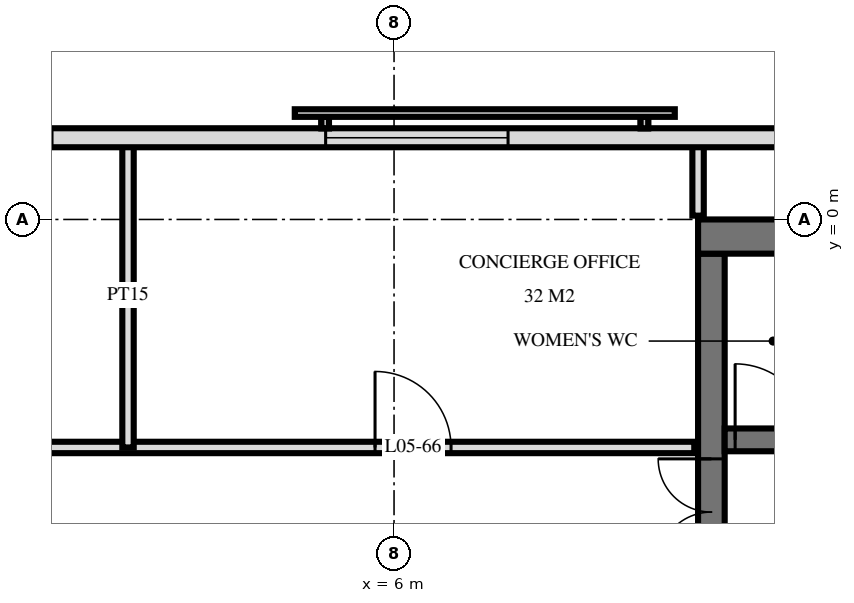
"""IFC4 building model, lengths in metres.
Left out: names, types, materials, properties, quantities, classifications, styles, units other than length and angle.
Written with IfcOpenShell. Run it as: python <this file> out.ifc"""

import sys

from ifc_helpers import new_model, si_unit, direction, frame, frame_2d, origin, place, context, subcontext, project, spatial, rectangle, extrude, element, fill, save


model = new_model("IFC4")
c1 = context("Model", 3, precision=1e-05, world=origin(), true_north=direction((0.0, 1.0)))
c2 = subcontext(c1, "Body", "Model", "MODEL_VIEW")
j1 = project(units=[si_unit("LENGTHUNIT", "METRE"), si_unit("PLANEANGLEUNIT", "RADIAN")], contexts=[c1])
p1 = place(None, origin())
s1 = spatial("IfcSite", under=j1, at=p1, CompositionType="ELEMENT")
p2 = place(p1, origin())
s2 = spatial("IfcBuilding", under=s1, at=p2, CompositionType="ELEMENT")
p3 = place(p2, frame((0.0, 0.0, 27.6)))
s3 = spatial("IfcBuildingStorey", under=s2, at=p3, CompositionType="ELEMENT", Elevation=27.6)
p4 = place(p3, frame((10.0, -0.225, 0.0), z_axis=(0.0, 0.0, 1.0), x_axis=(1.0, 0.0, 0.0)))
e1 = element("IfcWall", 1, at=p4, inside=s3, PredefinedType="SHEAR", context=c2, shape_type="SweptSolid", body=[
    extrude(rectangle(XDim=19.5, YDim=0.45, at=frame_2d((9.75, 0.0))), origin(), (0.0, 0.0, 1.0), 3.6),
])
p5 = place(p3, frame((10.175, -14.55, 0.0), z_axis=(0.0, 0.0, 1.0), x_axis=(0.0, 1.0, 0.0)))
e2 = element("IfcWall", 2, at=p5, inside=s3, PredefinedType="SHEAR", context=c2, shape_type="SweptSolid", body=[
    extrude(rectangle(XDim=14.1, YDim=0.35, at=frame_2d((7.05, 0.0))), origin(), (0.0, 0.0, 1.0), 3.6),
])
p6 = place(p5, frame((8.4, 0.0, 0.0)))
e3 = element("IfcOpeningElement", 3, at=p6, cuts=e2, PredefinedType="OPENING", context=c2, shape_type="SweptSolid", body=[
    extrude(rectangle(XDim=1.4, YDim=2.4, at=frame_2d((0.7, 1.2))), frame((0.0, 0.185, 0.0), z_axis=(0.0, -1.0, 0.0), x_axis=(1.0, 0.0, 0.0)), (0.0, 0.0, 1.0), 0.37),
])
p7 = place(p5, frame((10.0, 0.0, 0.0)))
e4 = element("IfcOpeningElement", 4, at=p7, cuts=e2, PredefinedType="OPENING", context=c2, shape_type="SweptSolid", body=[
    extrude(rectangle(XDim=1.4, YDim=2.4, at=frame_2d((0.7, 1.2))), frame((0.0, 0.185, 0.0), z_axis=(0.0, -1.0, 0.0), x_axis=(1.0, 0.0, 0.0)), (0.0, 0.0, 1.0), 0.37),
])
p8 = place(p5, frame((4.0, 0.0, 0.0)))
e5 = element("IfcOpeningElement", 5, at=p8, cuts=e2, PredefinedType="OPENING", context=c2, shape_type="SweptSolid", body=[
    extrude(rectangle(XDim=1.2, YDim=2.1, at=frame_2d((0.6, 1.05))), frame((0.0, 0.185, 0.0), z_axis=(0.0, -1.0, 0.0), x_axis=(1.0, 0.0, 0.0)), (0.0, 0.0, 1.0), 0.37),
])
p9 = place(p3, frame((10.35, -2.9, 0.0), z_axis=(0.0, 0.0, 1.0), x_axis=(1.0, 0.0, 0.0)))
e6 = element("IfcWall", 6, at=p9, inside=s3, PredefinedType="SHEAR", context=c2, shape_type="SweptSolid", body=[
    extrude(rectangle(XDim=18.7, YDim=0.3, at=frame_2d((9.35, 0.0))), origin(), (0.0, 0.0, 1.0), 3.6),
])
p10 = place(p9, frame((14.65, 0.0, 0.0)))
e7 = element("IfcOpeningElement", 7, at=p10, cuts=e6, PredefinedType="OPENING", context=c2, shape_type="SweptSolid", body=[
    extrude(rectangle(XDim=1.1, YDim=2.1, at=frame_2d((0.55, 1.05))), frame((0.0, 0.16, 0.0), z_axis=(0.0, -1.0, 0.0), x_axis=(1.0, 0.0, 0.0)), (0.0, 0.0, 1.0), 0.32),
])
p11 = place(p9, frame((17.05, 0.0, 0.0)))
e8 = element("IfcOpeningElement", 8, at=p11, cuts=e6, PredefinedType="OPENING", context=c2, shape_type="SweptSolid", body=[
    extrude(rectangle(XDim=1.1, YDim=2.1, at=frame_2d((0.55, 1.05))), frame((0.0, 0.16, 0.0), z_axis=(0.0, -1.0, 0.0), x_axis=(1.0, 0.0, 0.0)), (0.0, 0.0, 1.0), 0.32),
])
p12 = place(p9, frame((6.188, 0.0, 0.0)))
e9 = element("IfcOpeningElement", 9, at=p12, cuts=e6, PredefinedType="OPENING", context=c2, shape_type="SweptSolid", body=[
    extrude(rectangle(XDim=0.9, YDim=2.1, at=frame_2d((0.45, 1.05))), frame((0.0, 0.16, 0.0), z_axis=(0.0, -1.0, 0.0), x_axis=(1.0, 0.0, 0.0)), (0.0, 0.0, 1.0), 0.32),
])
p13 = place(p9, frame((7.613, 0.0, 0.0)))
e10 = element("IfcOpeningElement", 10, at=p13, cuts=e6, PredefinedType="OPENING", context=c2, shape_type="SweptSolid", body=[
    extrude(rectangle(XDim=0.9, YDim=2.1, at=frame_2d((0.45, 1.05))), frame((0.0, 0.16, 0.0), z_axis=(0.0, -1.0, 0.0), x_axis=(1.0, 0.0, 0.0)), (0.0, 0.0, 1.0), 0.32),
])
p14 = place(p9, frame((0.137, 0.0, 0.0)))
e11 = element("IfcOpeningElement", 11, at=p14, cuts=e6, PredefinedType="OPENING", context=c2, shape_type="SweptSolid", body=[
    extrude(rectangle(XDim=1.0, YDim=2.1, at=frame_2d((0.5, 1.05))), frame((0.0, 0.16, 0.0), z_axis=(0.0, -1.0, 0.0), x_axis=(1.0, 0.0, 0.0)), (0.0, 0.0, 1.0), 0.32),
])
p15 = place(p9, frame((1.562, 0.0, 0.0)))
e12 = element("IfcOpeningElement", 12, at=p15, cuts=e6, PredefinedType="OPENING", context=c2, shape_type="SweptSolid", body=[
    extrude(rectangle(XDim=1.0, YDim=2.1, at=frame_2d((0.5, 1.05))), frame((0.0, 0.16, 0.0), z_axis=(0.0, -1.0, 0.0), x_axis=(1.0, 0.0, 0.0)), (0.0, 0.0, 1.0), 0.32),
])
p16 = place(p9, frame((3.85, 0.0, 0.0)))
e13 = element("IfcOpeningElement", 13, at=p16, cuts=e6, PredefinedType="OPENING", context=c2, shape_type="SweptSolid", body=[
    extrude(rectangle(XDim=1.0, YDim=2.1, at=frame_2d((0.5, 1.05))), frame((0.0, 0.16, 0.0), z_axis=(0.0, -1.0, 0.0), x_axis=(1.0, 0.0, 0.0)), (0.0, 0.0, 1.0), 0.32),
])
p17 = place(p9, frame((12.1, 0.0, 0.0)))
e14 = element("IfcOpeningElement", 14, at=p17, cuts=e6, PredefinedType="OPENING", context=c2, shape_type="SweptSolid", body=[
    extrude(rectangle(XDim=1.0, YDim=2.1, at=frame_2d((0.5, 1.05))), frame((0.0, 0.16, 0.0), z_axis=(0.0, -1.0, 0.0), x_axis=(1.0, 0.0, 0.0)), (0.0, 0.0, 1.0), 0.32),
])
p18 = place(p3, frame((28.775, 1.075, 0.0), z_axis=(0.0, 0.0, 1.0), x_axis=(-1.0, 0.0, 0.0)))
e15 = element("IfcWall", 15, at=p18, inside=s3, PredefinedType="SOLIDWALL", context=c2, shape_type="SweptSolid", body=[
    extrude(rectangle(XDim=57.551, YDim=0.25, at=frame_2d((28.775, 0.0))), origin(), (0.0, 0.0, 1.0), 3.32),
])
p19 = place(p18, frame((21.275, 0.0, 0.3)))
e16 = element("IfcOpeningElement", 16, at=p19, cuts=e15, PredefinedType="OPENING", context=c2, shape_type="SweptSolid", body=[
    extrude(rectangle(XDim=2.4, YDim=2.1, at=frame_2d((1.2, 1.05))), frame((0.0, 0.135, 0.0), z_axis=(0.0, -1.0, 0.0), x_axis=(1.0, 0.0, 0.0)), (0.0, 0.0, 1.0), 0.27),
])
p20 = place(p18, frame((27.275, 0.0, 0.3)))
e17 = element("IfcOpeningElement", 17, at=p20, cuts=e15, PredefinedType="OPENING", context=c2, shape_type="SweptSolid", body=[
    extrude(rectangle(XDim=2.4, YDim=2.1, at=frame_2d((1.2, 1.05))), frame((0.0, 0.135, 0.0), z_axis=(0.0, -1.0, 0.0), x_axis=(1.0, 0.0, 0.0)), (0.0, 0.0, 1.0), 0.27),
])
p21 = place(p18, frame((30.275, 0.0, 0.3)))
e18 = element("IfcOpeningElement", 18, at=p21, cuts=e15, PredefinedType="OPENING", context=c2, shape_type="SweptSolid", body=[
    extrude(rectangle(XDim=2.4, YDim=2.1, at=frame_2d((1.2, 1.05))), frame((0.0, 0.135, 0.0), z_axis=(0.0, -1.0, 0.0), x_axis=(1.0, 0.0, 0.0)), (0.0, 0.0, 1.0), 0.27),
])
p22 = place(p3, frame((10.0, 0.05, 0.0), z_axis=(0.0, 0.0, 1.0), x_axis=(0.0, 1.0, 0.0)))
e19 = element("IfcWall", 19, at=p22, inside=s3, PredefinedType="PARTITIONING", context=c2, shape_type="SweptSolid", body=[
    extrude(rectangle(XDim=0.97, YDim=0.15, at=frame_2d((0.485, 0.0))), origin(), (0.0, 0.0, 1.0), 3.32),
])
p23 = place(p3, frame((2.5, -3.0, 0.0), z_axis=(0.0, 0.0, 1.0), x_axis=(0.0, 1.0, 0.0)))
e20 = element("IfcWall", 20, at=p23, inside=s3, PredefinedType="PARTITIONING", context=c2, shape_type="SweptSolid", body=[
    extrude(rectangle(XDim=4.02, YDim=0.15, at=frame_2d((2.01, 0.0))), origin(), (0.0, 0.0, 1.0), 3.32),
])
p24 = place(p3, frame((-9.95, -3.0, 0.0), z_axis=(0.0, 0.0, 1.0), x_axis=(1.0, 0.0, 0.0)))
e21 = element("IfcWall", 21, at=p24, inside=s3, PredefinedType="PARTITIONING", context=c2, shape_type="SweptSolid", body=[
    extrude(rectangle(XDim=19.9, YDim=0.15, at=frame_2d((9.95, 0.0))), origin(), (0.0, 0.0, 1.0), 3.32),
])
p25 = place(p24, frame((0.95, 0.0, 0.0)))
e22 = element("IfcOpeningElement", 22, at=p25, cuts=e21, PredefinedType="OPENING", context=c2, shape_type="SweptSolid", body=[
    extrude(rectangle(XDim=1.0, YDim=2.1, at=frame_2d((0.5, 1.05))), frame((0.0, 0.085, 0.0), z_axis=(0.0, -1.0, 0.0), x_axis=(1.0, 0.0, 0.0)), (0.0, 0.0, 1.0), 0.17),
])
p26 = place(p24, frame((3.7, 0.0, 0.0)))
e23 = element("IfcOpeningElement", 23, at=p26, cuts=e21, PredefinedType="OPENING", context=c2, shape_type="SweptSolid", body=[
    extrude(rectangle(XDim=1.0, YDim=2.1, at=frame_2d((0.5, 1.05))), frame((0.0, 0.085, 0.0), z_axis=(0.0, -1.0, 0.0), x_axis=(1.0, 0.0, 0.0)), (0.0, 0.0, 1.0), 0.17),
])
p27 = place(p24, frame((8.45, 0.0, 0.0)))
e24 = element("IfcOpeningElement", 24, at=p27, cuts=e21, PredefinedType="OPENING", context=c2, shape_type="SweptSolid", body=[
    extrude(rectangle(XDim=1.0, YDim=2.1, at=frame_2d((0.5, 1.05))), frame((0.0, 0.085, 0.0), z_axis=(0.0, -1.0, 0.0), x_axis=(1.0, 0.0, 0.0)), (0.0, 0.0, 1.0), 0.17),
])
p28 = place(p24, frame((15.7, 0.0, 0.0)))
e25 = element("IfcOpeningElement", 25, at=p28, cuts=e21, PredefinedType="OPENING", context=c2, shape_type="SweptSolid", body=[
    extrude(rectangle(XDim=1.0, YDim=2.1, at=frame_2d((0.5, 1.05))), frame((0.0, 0.085, 0.0), z_axis=(0.0, -1.0, 0.0), x_axis=(1.0, 0.0, 0.0)), (0.0, 0.0, 1.0), 0.17),
])
p29 = place(p19, origin())
e26 = element("IfcWindow", 26, at=p29, inside=s3, PartitioningType="SINGLE_PANEL", PredefinedType="WINDOW", context=c2, shape_type="SweptSolid", body=[
    extrude(rectangle(XDim=2.4, YDim=2.1, at=frame_2d((1.2, 1.05))), frame((0.0, 0.03, 0.0), z_axis=(0.0, -1.0, 0.0), x_axis=(1.0, 0.0, 0.0)), (0.0, 0.0, 1.0), 0.06),
])
fill(e16, e26)
p30 = place(p7, origin())
e27 = element("IfcDoor", 27, at=p30, inside=s3, OperationType="DOUBLE_DOOR_SINGLE_SWING", PredefinedType="DOOR", context=c2, shape_type="SweptSolid", body=[
    extrude(rectangle(XDim=1.4, YDim=2.4, at=frame_2d((0.7, 1.2))), frame((0.0, 0.025, 0.0), z_axis=(0.0, -1.0, 0.0), x_axis=(1.0, 0.0, 0.0)), (0.0, 0.0, 1.0), 0.05),
])
fill(e4, e27)
p31 = place(p14, origin())
e28 = element("IfcDoor", 28, at=p31, inside=s3, OperationType="SINGLE_SWING_RIGHT", PredefinedType="DOOR", context=c2, shape_type="SweptSolid", body=[
    extrude(rectangle(XDim=1.0, YDim=2.1, at=frame_2d((0.5, 1.05))), frame((0.0, 0.025, 0.0), z_axis=(0.0, -1.0, 0.0), x_axis=(1.0, 0.0, 0.0)), (0.0, 0.0, 1.0), 0.05),
])
fill(e11, e28)
p32 = place(p28, origin())
e29 = element("IfcDoor", 29, at=p32, inside=s3, OperationType="SINGLE_SWING_RIGHT", PredefinedType="DOOR", context=c2, shape_type="SweptSolid", body=[
    extrude(rectangle(XDim=1.0, YDim=2.1, at=frame_2d((0.5, 1.05))), frame((0.0, 0.025, 0.0), z_axis=(0.0, -1.0, 0.0), x_axis=(1.0, 0.0, 0.0)), (0.0, 0.0, 1.0), 0.05),
])
fill(e25, e29)
save(model, sys.argv[1])
